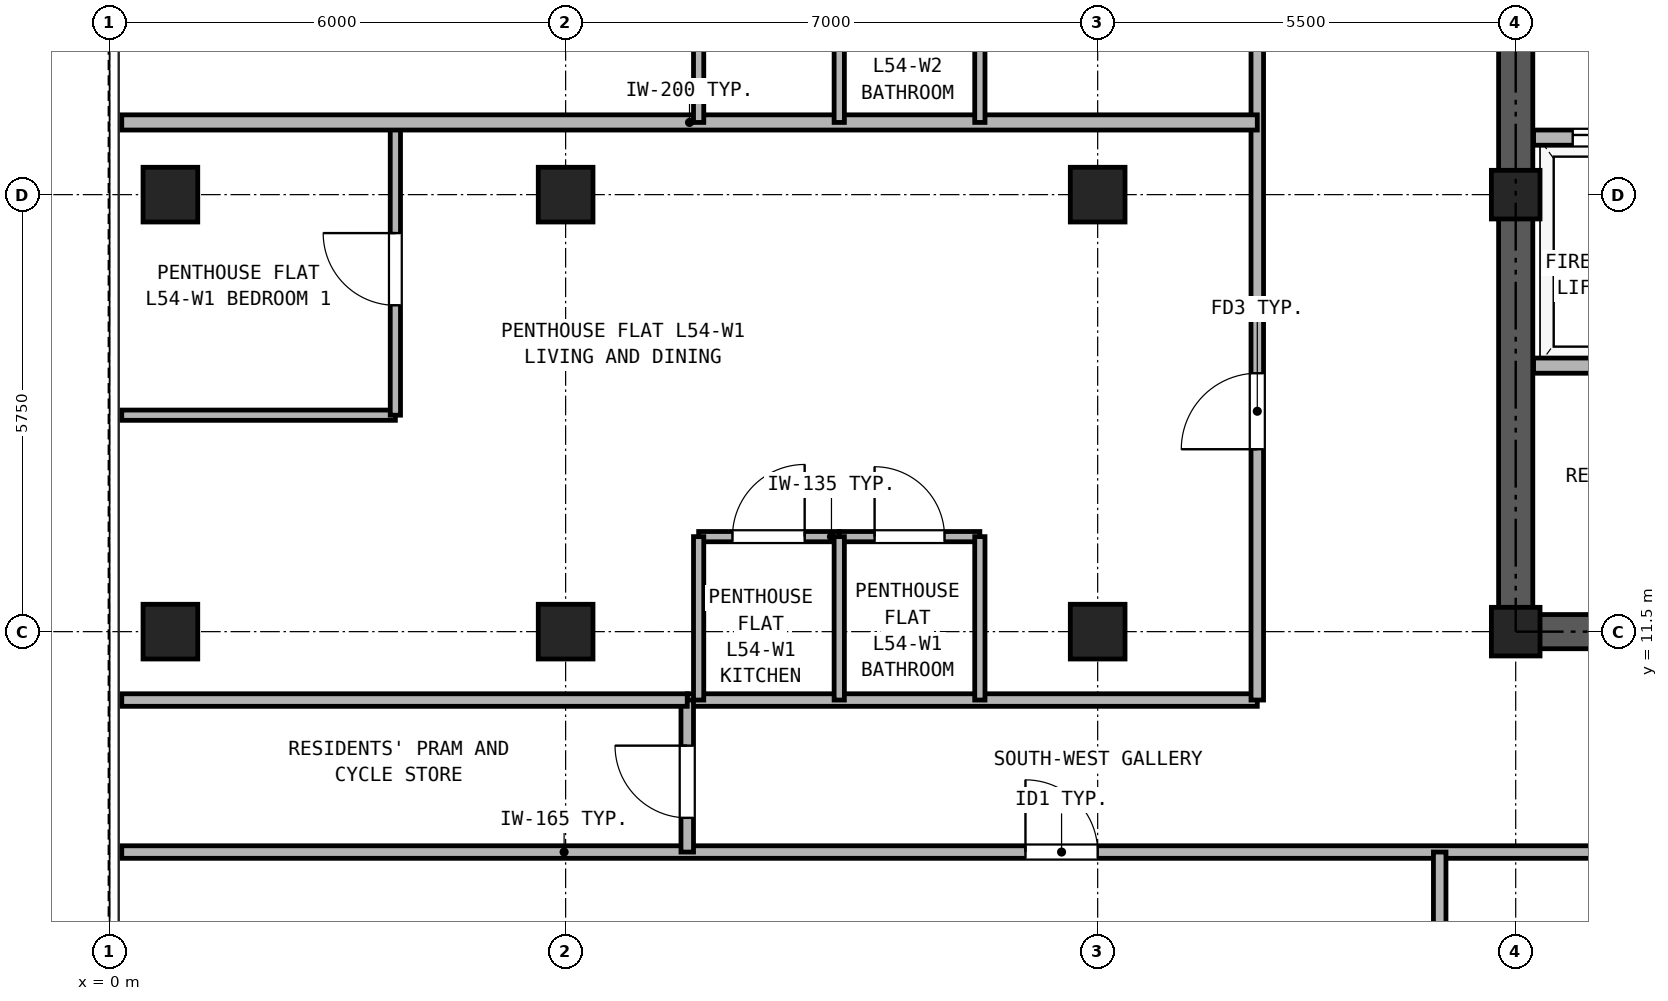
"""IFC4 building model, lengths in metres.
Left out: names, types, materials, properties, quantities, classifications, styles, units other than length and angle.
Written with IfcOpenShell. Run it as: python <this file> out.ifc"""

import sys

from ifc_helpers import new_model, si_unit, direction, frame, frame_2d, origin, origin_2d, place, context, subcontext, project, spatial, rectangle, hollow_rectangle, extrude, source, transform, mapped, element, fill, save


model = new_model("IFC4")
c1 = context("Model", 3, precision=1e-05, world=origin(), true_north=direction((0.0, 1.0)))
c2 = subcontext(c1, "Body", "Model", "MODEL_VIEW")
j1 = project(units=[si_unit("LENGTHUNIT", "METRE"), si_unit("PLANEANGLEUNIT", "RADIAN")], contexts=[c1])
p1 = place(None, origin())
s1 = spatial("IfcSite", under=j1, at=p1, CompositionType="ELEMENT")
p2 = place(p1, origin())
s2 = spatial("IfcBuilding", under=s1, at=p2, CompositionType="ELEMENT")
p3 = place(p2, frame((0.0, 0.0, 193.2)))
s3 = spatial("IfcBuildingStorey", under=s2, at=p3, CompositionType="ELEMENT", Elevation=193.2)
m1 = source(origin(), c2, "Body", "SweptSolid", [
    extrude(hollow_rectangle(XDim=0.72, YDim=0.72, WallThickness=0.04, at=origin_2d()), origin(), (0.0, 0.0, 1.0), 2.95),
])
for number, where, z_axis, x_axis in (
    (1, (0.8, 11.5, 0.0), (0.0, 0.0, 1.0), (1.0, 0.0, 0.0)),
    (2, (0.8, 17.25, 0.0), (0.0, 0.0, 1.0), (1.0, 0.0, 0.0)),
    (3, (6.0, 11.5, 0.0), (0.0, 0.0, 1.0), (1.0, 0.0, 0.0)),
    (4, (6.0, 17.25, 0.0), (0.0, 0.0, 1.0), (1.0, 0.0, 0.0)),
    (5, (13.0, 11.5, 0.0), (0.0, 0.0, 1.0), (1.0, 0.0, 0.0)),
    (6, (13.0, 17.25, 0.0), (0.0, 0.0, 1.0), (1.0, 0.0, 0.0)),
):
    element("IfcColumn", number, at=place(p3, frame(where, z_axis=z_axis, x_axis=x_axis)), inside=s3, PredefinedType="COLUMN", context=c2, shape_type="MappedRepresentation", body=[
        mapped(m1, transform((0.0, 0.0, 0.0), x_axis=(1.0, 0.0, 0.0), y_axis=(0.0, 1.0, 0.0), z_axis=(0.0, 0.0, 1.0), scale=1.0)),
    ])
m2 = source(origin(), c2, "Body", "SweptSolid", [
    extrude(hollow_rectangle(XDim=0.64, YDim=0.64, WallThickness=0.035, at=origin_2d()), origin(), (0.0, 0.0, 1.0), 2.95),
])
for number, where, z_axis, x_axis in (
    (7, (18.5, 11.5, 0.0), (0.0, 0.0, 1.0), (1.0, 0.0, 0.0)),
    (8, (18.5, 17.25, 0.0), (0.0, 0.0, 1.0), (1.0, 0.0, 0.0)),
):
    element("IfcColumn", number, at=place(p3, frame(where, z_axis=z_axis, x_axis=x_axis)), inside=s3, PredefinedType="COLUMN", context=c2, shape_type="MappedRepresentation", body=[
        mapped(m2, transform((0.0, 0.0, 0.0), x_axis=(1.0, 0.0, 0.0), y_axis=(0.0, 1.0, 0.0), z_axis=(0.0, 0.0, 1.0), scale=1.0)),
    ])
p4 = place(p3, frame((18.275, 11.5, 0.0), z_axis=(0.0, 0.0, 1.0), x_axis=(1.0, 0.0, 0.0)))
e9 = element("IfcWall", 9, at=p4, inside=s3, PredefinedType="SHEAR", context=c2, shape_type="SweptSolid", body=[
    extrude(rectangle(XDim=10.45, YDim=0.45, at=frame_2d((5.225, 0.0))), origin(), (0.0, 0.0, 1.0), 2.95),
])
p5 = place(p4, frame((1.825, 0.0, 0.0)))
e10 = element("IfcOpeningElement", 10, at=p5, cuts=e9, PredefinedType="OPENING", context=c2, shape_type="SweptSolid", body=[
    extrude(rectangle(XDim=0.95, YDim=2.15, at=frame_2d((0.475, 1.075))), frame((0.0, 0.235, 0.0), z_axis=(0.0, -1.0, 0.0), x_axis=(1.0, 0.0, 0.0)), (0.0, 0.0, 1.0), 0.47),
])
p6 = place(p4, frame((5.325, 0.0, 0.0)))
e11 = element("IfcOpeningElement", 11, at=p6, cuts=e9, PredefinedType="OPENING", context=c2, shape_type="SweptSolid", body=[
    extrude(rectangle(XDim=0.95, YDim=2.15, at=frame_2d((0.475, 1.075))), frame((0.0, 0.235, 0.0), z_axis=(0.0, -1.0, 0.0), x_axis=(1.0, 0.0, 0.0)), (0.0, 0.0, 1.0), 0.47),
])
p7 = place(p4, frame((8.225, 0.0, 0.0)))
e12 = element("IfcOpeningElement", 12, at=p7, cuts=e9, PredefinedType="OPENING", context=c2, shape_type="SweptSolid", body=[
    extrude(rectangle(XDim=1.1, YDim=2.25, at=frame_2d((0.55, 1.125))), frame((0.0, 0.235, 0.0), z_axis=(0.0, -1.0, 0.0), x_axis=(1.0, 0.0, 0.0)), (0.0, 0.0, 1.0), 0.47),
])
p8 = place(p3, frame((18.5, 11.725, 0.0), z_axis=(0.0, 0.0, 1.0), x_axis=(0.0, 1.0, 0.0)))
e13 = element("IfcWall", 13, at=p8, inside=s3, PredefinedType="SHEAR", context=c2, shape_type="SweptSolid", body=[
    extrude(rectangle(XDim=16.8, YDim=0.45, at=frame_2d((8.4, 0.0))), origin(), (0.0, 0.0, 1.0), 2.95),
])
p9 = place(p8, frame((7.425, 0.0, 0.0)))
e14 = element("IfcOpeningElement", 14, at=p9, cuts=e13, PredefinedType="OPENING", context=c2, shape_type="SweptSolid", body=[
    extrude(rectangle(XDim=1.15, YDim=2.2, at=frame_2d((0.575, 1.1))), frame((0.0, 0.235, 0.0), z_axis=(0.0, -1.0, 0.0), x_axis=(1.0, 0.0, 0.0)), (0.0, 0.0, 1.0), 0.47),
])
p10 = place(p3, frame((18.735, 18.0, 0.0), z_axis=(0.0, 0.0, 1.0), x_axis=(1.0, 0.0, 0.0)))
e15 = element("IfcWall", 15, at=p10, inside=s3, PredefinedType="PARTITIONING", context=c2, shape_type="SweptSolid", body=[
    extrude(rectangle(XDim=9.53, YDim=0.2, at=frame_2d((4.765, 0.0))), origin(), (0.0, 0.0, 1.0), 2.95),
])
p11 = place(p10, frame((0.515, 0.0, 0.0)))
e16 = element("IfcOpeningElement", 16, at=p11, cuts=e15, PredefinedType="OPENING", context=c2, shape_type="SweptSolid", body=[
    extrude(rectangle(XDim=1.3, YDim=2.3, at=frame_2d((0.65, 1.15))), frame((0.0, 0.11, 0.0), z_axis=(0.0, -1.0, 0.0), x_axis=(1.0, 0.0, 0.0)), (0.0, 0.0, 1.0), 0.22),
])
p12 = place(p10, frame((2.615, 0.0, 0.0)))
e17 = element("IfcOpeningElement", 17, at=p12, cuts=e15, PredefinedType="OPENING", context=c2, shape_type="SweptSolid", body=[
    extrude(rectangle(XDim=1.3, YDim=2.3, at=frame_2d((0.65, 1.15))), frame((0.0, 0.11, 0.0), z_axis=(0.0, -1.0, 0.0), x_axis=(1.0, 0.0, 0.0)), (0.0, 0.0, 1.0), 0.22),
])
p13 = place(p10, frame((5.035, 0.0, 0.0)))
e18 = element("IfcOpeningElement", 18, at=p13, cuts=e15, PredefinedType="OPENING", context=c2, shape_type="SweptSolid", body=[
    extrude(rectangle(XDim=0.9, YDim=2.05, at=frame_2d((0.45, 1.025))), frame((0.0, 0.11, 0.0), z_axis=(0.0, -1.0, 0.0), x_axis=(1.0, 0.0, 0.0)), (0.0, 0.0, 1.0), 0.22),
])
p14 = place(p10, frame((8.165, 0.0, 0.0)))
e19 = element("IfcOpeningElement", 19, at=p14, cuts=e15, PredefinedType="OPENING", context=c2, shape_type="SweptSolid", body=[
    extrude(rectangle(XDim=0.9, YDim=2.05, at=frame_2d((0.45, 1.025))), frame((0.0, 0.11, 0.0), z_axis=(0.0, -1.0, 0.0), x_axis=(1.0, 0.0, 0.0)), (0.0, 0.0, 1.0), 0.22),
])
p15 = place(p3, frame((18.735, 15.0, 0.0), z_axis=(0.0, 0.0, 1.0), x_axis=(1.0, 0.0, 0.0)))
e20 = element("IfcWall", 20, at=p15, inside=s3, PredefinedType="PARTITIONING", context=c2, shape_type="SweptSolid", body=[
    extrude(rectangle(XDim=9.53, YDim=0.2, at=frame_2d((4.765, 0.0))), origin(), (0.0, 0.0, 1.0), 2.95),
])
p16 = place(p3, frame((0.16, 8.6, 0.0), z_axis=(0.0, 0.0, 1.0), x_axis=(1.0, 0.0, 0.0)))
e21 = element("IfcWall", 21, at=p16, inside=s3, PredefinedType="PARTITIONING", context=c2, shape_type="SweptSolid", body=[
    extrude(rectangle(XDim=41.48, YDim=0.165, at=frame_2d((20.74, 0.0))), origin(), (0.0, 0.0, 1.0), 2.583),
])
p17 = place(p16, frame((11.89, 0.0, 0.0)))
e22 = element("IfcOpeningElement", 22, at=p17, cuts=e21, PredefinedType="OPENING", context=c2, shape_type="SweptSolid", body=[
    extrude(rectangle(XDim=0.95, YDim=2.15, at=frame_2d((0.475, 1.075))), frame((0.0, 0.093, 0.0), z_axis=(0.0, -1.0, 0.0), x_axis=(1.0, 0.0, 0.0)), (0.0, 0.0, 1.0), 0.185),
])
p18 = place(p16, frame((20.59, 0.0, 0.0)))
e23 = element("IfcOpeningElement", 23, at=p18, cuts=e21, PredefinedType="OPENING", context=c2, shape_type="SweptSolid", body=[
    extrude(rectangle(XDim=0.95, YDim=2.15, at=frame_2d((0.475, 1.075))), frame((0.0, 0.093, 0.0), z_axis=(0.0, -1.0, 0.0), x_axis=(1.0, 0.0, 0.0)), (0.0, 0.0, 1.0), 0.185),
])
p19 = place(p16, frame((27.59, 0.0, 0.0)))
e24 = element("IfcOpeningElement", 24, at=p19, cuts=e21, PredefinedType="OPENING", context=c2, shape_type="SweptSolid", body=[
    extrude(rectangle(XDim=0.95, YDim=2.15, at=frame_2d((0.475, 1.075))), frame((0.0, 0.093, 0.0), z_axis=(0.0, -1.0, 0.0), x_axis=(1.0, 0.0, 0.0)), (0.0, 0.0, 1.0), 0.185),
])
p20 = place(p16, frame((34.19, 0.0, 0.0)))
e25 = element("IfcOpeningElement", 25, at=p20, cuts=e21, PredefinedType="OPENING", context=c2, shape_type="SweptSolid", body=[
    extrude(rectangle(XDim=0.95, YDim=2.15, at=frame_2d((0.475, 1.075))), frame((0.0, 0.093, 0.0), z_axis=(0.0, -1.0, 0.0), x_axis=(1.0, 0.0, 0.0)), (0.0, 0.0, 1.0), 0.185),
])
p21 = place(p3, frame((7.6, 10.6, 0.0), z_axis=(0.0, 0.0, 1.0), x_axis=(1.0, 0.0, 0.0)))
e26 = element("IfcWall", 26, at=p21, inside=s3, PredefinedType="PARTITIONING", context=c2, shape_type="SweptSolid", body=[
    extrude(rectangle(XDim=7.5, YDim=0.165, at=frame_2d((3.75, 0.0))), origin(), (0.0, 0.0, 1.0), 2.95),
])
p22 = place(p3, frame((7.6, 8.6, 0.0), z_axis=(0.0, 0.0, 1.0), x_axis=(0.0, 1.0, 0.0)))
e27 = element("IfcWall", 27, at=p22, inside=s3, PredefinedType="PARTITIONING", context=c2, shape_type="SweptSolid", body=[
    extrude(rectangle(XDim=2.0, YDim=0.165, at=frame_2d((1.0, 0.0))), origin(), (0.0, 0.0, 1.0), 2.95),
])
p23 = place(p22, frame((0.45, 0.0, 0.0)))
e28 = element("IfcOpeningElement", 28, at=p23, cuts=e27, PredefinedType="OPENING", context=c2, shape_type="SweptSolid", body=[
    extrude(rectangle(XDim=0.95, YDim=2.15, at=frame_2d((0.475, 1.075))), frame((0.0, 0.093, 0.0), z_axis=(0.0, -1.0, 0.0), x_axis=(1.0, 0.0, 0.0)), (0.0, 0.0, 1.0), 0.185),
])
p24 = place(p3, frame((15.1, 10.6, 0.0), z_axis=(0.0, 0.0, 1.0), x_axis=(0.0, 1.0, 0.0)))
e29 = element("IfcWall", 29, at=p24, inside=s3, PredefinedType="PARTITIONING", context=c2, shape_type="SweptSolid", body=[
    extrude(rectangle(XDim=24.54, YDim=0.165, at=frame_2d((12.27, 0.0))), origin(), (0.0, 0.0, 1.0), 2.95),
])
p25 = place(p24, frame((3.3, 0.0, 0.0)))
e30 = element("IfcOpeningElement", 30, at=p25, cuts=e29, PredefinedType="OPENING", context=c2, shape_type="SweptSolid", body=[
    extrude(rectangle(XDim=1.0, YDim=2.15, at=frame_2d((0.5, 1.075))), frame((0.0, 0.093, 0.0), z_axis=(0.0, -1.0, 0.0), x_axis=(1.0, 0.0, 0.0)), (0.0, 0.0, 1.0), 0.185),
])
p26 = place(p24, frame((11.1, 0.0, 0.0)))
e31 = element("IfcOpeningElement", 31, at=p26, cuts=e29, PredefinedType="OPENING", context=c2, shape_type="SweptSolid", body=[
    extrude(rectangle(XDim=1.0, YDim=2.15, at=frame_2d((0.5, 1.075))), frame((0.0, 0.093, 0.0), z_axis=(0.0, -1.0, 0.0), x_axis=(1.0, 0.0, 0.0)), (0.0, 0.0, 1.0), 0.185),
])
p27 = place(p24, frame((18.0, 0.0, 0.0)))
e32 = element("IfcOpeningElement", 32, at=p27, cuts=e29, PredefinedType="OPENING", context=c2, shape_type="SweptSolid", body=[
    extrude(rectangle(XDim=1.0, YDim=2.15, at=frame_2d((0.5, 1.075))), frame((0.0, 0.093, 0.0), z_axis=(0.0, -1.0, 0.0), x_axis=(1.0, 0.0, 0.0)), (0.0, 0.0, 1.0), 0.185),
])
p28 = place(p3, frame((17.5, 0.16, 0.0), z_axis=(0.0, 0.0, 1.0), x_axis=(0.0, 1.0, 0.0)))
e33 = element("IfcWall", 33, at=p28, inside=s3, PredefinedType="PARTITIONING", context=c2, shape_type="SweptSolid", body=[
    extrude(rectangle(XDim=8.44, YDim=0.165, at=frame_2d((4.22, 0.0))), origin(), (0.0, 0.0, 1.0), 2.95),
])
p29 = place(p3, frame((0.16, 10.6, 0.0), z_axis=(0.0, 0.0, 1.0), x_axis=(1.0, 0.0, 0.0)))
e34 = element("IfcWall", 34, at=p29, inside=s3, PredefinedType="PARTITIONING", context=c2, shape_type="SweptSolid", body=[
    extrude(rectangle(XDim=7.44, YDim=0.165, at=frame_2d((3.72, 0.0))), origin(), (0.0, 0.0, 1.0), 2.95),
])
p30 = place(p3, frame((7.75, 12.75, 0.0), z_axis=(0.0, 0.0, 1.0), x_axis=(1.0, 0.0, 0.0)))
e35 = element("IfcWall", 35, at=p30, inside=s3, PredefinedType="PARTITIONING", context=c2, shape_type="SweptSolid", body=[
    extrude(rectangle(XDim=1.85, YDim=0.135, at=frame_2d((0.925, 0.0))), origin(), (0.0, 0.0, 1.0), 2.95),
])
p31 = place(p30, frame((0.445, 0.0, 0.0)))
e36 = element("IfcOpeningElement", 36, at=p31, cuts=e35, PredefinedType="OPENING", context=c2, shape_type="SweptSolid", body=[
    extrude(rectangle(XDim=0.95, YDim=2.15, at=frame_2d((0.475, 1.075))), frame((0.0, 0.077, 0.0), z_axis=(0.0, -1.0, 0.0), x_axis=(1.0, 0.0, 0.0)), (0.0, 0.0, 1.0), 0.155),
])
p32 = place(p3, frame((9.6, 12.75, 0.0), z_axis=(0.0, 0.0, 1.0), x_axis=(1.0, 0.0, 0.0)))
e37 = element("IfcWall", 37, at=p32, inside=s3, PredefinedType="PARTITIONING", context=c2, shape_type="SweptSolid", body=[
    extrude(rectangle(XDim=1.85, YDim=0.135, at=frame_2d((0.925, 0.0))), origin(), (0.0, 0.0, 1.0), 2.95),
])
p33 = place(p32, frame((0.465, 0.0, 0.0)))
e38 = element("IfcOpeningElement", 38, at=p33, cuts=e37, PredefinedType="OPENING", context=c2, shape_type="SweptSolid", body=[
    extrude(rectangle(XDim=0.92, YDim=2.1, at=frame_2d((0.46, 1.05))), frame((0.0, 0.077, 0.0), z_axis=(0.0, -1.0, 0.0), x_axis=(1.0, 0.0, 0.0)), (0.0, 0.0, 1.0), 0.155),
])
for number, where, z_axis, x_axis in (
    (39, (7.75, 10.6, 0.0), (0.0, 0.0, 1.0), (0.0, 1.0, 0.0)),
    (40, (9.6, 10.6, 0.0), (0.0, 0.0, 1.0), (0.0, 1.0, 0.0)),
    (41, (11.45, 10.6, 0.0), (0.0, 0.0, 1.0), (0.0, 1.0, 0.0)),
):
    element("IfcWall", number, at=place(p3, frame(where, z_axis=z_axis, x_axis=x_axis)), inside=s3, PredefinedType="PARTITIONING", context=c2, shape_type="SweptSolid", body=[
        extrude(rectangle(XDim=2.15, YDim=0.135, at=frame_2d((1.075, 0.0))), origin(), (0.0, 0.0, 1.0), 2.95),
    ])
p34 = place(p3, frame((0.16, 14.348, 0.0), z_axis=(0.0, 0.0, 1.0), x_axis=(1.0, 0.0, 0.0)))
e42 = element("IfcWall", 42, at=p34, inside=s3, PredefinedType="PARTITIONING", context=c2, shape_type="SweptSolid", body=[
    extrude(rectangle(XDim=3.6, YDim=0.135, at=frame_2d((1.8, 0.0))), origin(), (0.0, 0.0, 1.0), 2.583),
])
p35 = place(p3, frame((3.76, 14.348, 0.0), z_axis=(0.0, 0.0, 1.0), x_axis=(0.0, 1.0, 0.0)))
e43 = element("IfcWall", 43, at=p35, inside=s3, PredefinedType="PARTITIONING", context=c2, shape_type="SweptSolid", body=[
    extrude(rectangle(XDim=3.852, YDim=0.135, at=frame_2d((1.926, 0.0))), origin(), (0.0, 0.0, 1.0), 2.95),
])
p36 = place(p35, frame((1.446, 0.0, 0.0)))
e44 = element("IfcOpeningElement", 44, at=p36, cuts=e43, PredefinedType="OPENING", context=c2, shape_type="SweptSolid", body=[
    extrude(rectangle(XDim=0.95, YDim=2.15, at=frame_2d((0.475, 1.075))), frame((0.0, 0.077, 0.0), z_axis=(0.0, -1.0, 0.0), x_axis=(1.0, 0.0, 0.0)), (0.0, 0.0, 1.0), 0.155),
])
p37 = place(p3, frame((0.16, 18.2, 0.0), z_axis=(0.0, 0.0, 1.0), x_axis=(1.0, 0.0, 0.0)))
e45 = element("IfcWall", 45, at=p37, inside=s3, PredefinedType="PARTITIONING", context=c2, shape_type="SweptSolid", body=[
    extrude(rectangle(XDim=14.94, YDim=0.2, at=frame_2d((7.47, 0.0))), origin(), (0.0, 0.0, 1.0), 2.95),
])
for number, where, z_axis, x_axis in (
    (46, (7.75, 18.2, 0.0), (0.0, 0.0, 1.0), (0.0, 1.0, 0.0)),
    (47, (9.6, 18.2, 0.0), (0.0, 0.0, 1.0), (0.0, 1.0, 0.0)),
    (48, (11.45, 18.2, 0.0), (0.0, 0.0, 1.0), (0.0, 1.0, 0.0)),
):
    element("IfcWall", number, at=place(p3, frame(where, z_axis=z_axis, x_axis=x_axis)), inside=s3, PredefinedType="PARTITIONING", context=c2, shape_type="SweptSolid", body=[
        extrude(rectangle(XDim=2.15, YDim=0.135, at=frame_2d((1.075, 0.0))), origin(), (0.0, 0.0, 1.0), 2.95),
    ])
p38 = place(p11, origin())
e49 = element("IfcDoor", 49, at=p38, inside=s3, OperationType="DOUBLE_DOOR_SLIDING", PredefinedType="DOOR", context=c2, shape_type="SweptSolid", body=[
    extrude(rectangle(XDim=1.3, YDim=2.3, at=frame_2d((0.65, 1.15))), frame((0.0, 0.025, 0.0), z_axis=(0.0, -1.0, 0.0), x_axis=(1.0, 0.0, 0.0)), (0.0, 0.0, 1.0), 0.05),
])
fill(e16, e49)
p39 = place(p17, frame((0.95, 0.0, 0.0), z_axis=(0.0, 0.0, 1.0), x_axis=(-1.0, 0.0, 0.0)))
e50 = element("IfcDoor", 50, at=p39, inside=s3, OperationType="SINGLE_SWING_LEFT", PredefinedType="DOOR", context=c2, shape_type="SweptSolid", body=[
    extrude(rectangle(XDim=0.95, YDim=2.15, at=frame_2d((0.475, 1.075))), frame((0.0, 0.025, 0.0), z_axis=(0.0, -1.0, 0.0), x_axis=(1.0, 0.0, 0.0)), (0.0, 0.0, 1.0), 0.05),
])
fill(e22, e50)
p40 = place(p23, frame((0.95, 0.0, 0.0), z_axis=(0.0, 0.0, 1.0), x_axis=(-1.0, 0.0, 0.0)))
e51 = element("IfcDoor", 51, at=p40, inside=s3, OperationType="SINGLE_SWING_RIGHT", PredefinedType="DOOR", context=c2, shape_type="SweptSolid", body=[
    extrude(rectangle(XDim=0.95, YDim=2.15, at=frame_2d((0.475, 1.075))), frame((0.0, 0.025, 0.0), z_axis=(0.0, -1.0, 0.0), x_axis=(1.0, 0.0, 0.0)), (0.0, 0.0, 1.0), 0.05),
])
fill(e28, e51)
p41 = place(p31, origin())
e52 = element("IfcDoor", 52, at=p41, inside=s3, OperationType="SINGLE_SWING_RIGHT", PredefinedType="DOOR", context=c2, shape_type="SweptSolid", body=[
    extrude(rectangle(XDim=0.95, YDim=2.15, at=frame_2d((0.475, 1.075))), frame((0.0, 0.025, 0.0), z_axis=(0.0, -1.0, 0.0), x_axis=(1.0, 0.0, 0.0)), (0.0, 0.0, 1.0), 0.05),
])
fill(e36, e52)
p42 = place(p33, origin())
e53 = element("IfcDoor", 53, at=p42, inside=s3, OperationType="SINGLE_SWING_LEFT", PredefinedType="DOOR", context=c2, shape_type="SweptSolid", body=[
    extrude(rectangle(XDim=0.92, YDim=2.1, at=frame_2d((0.46, 1.05))), frame((0.0, 0.025, 0.0), z_axis=(0.0, -1.0, 0.0), x_axis=(1.0, 0.0, 0.0)), (0.0, 0.0, 1.0), 0.05),
])
fill(e38, e53)
p43 = place(p36, origin())
e54 = element("IfcDoor", 54, at=p43, inside=s3, OperationType="SINGLE_SWING_RIGHT", PredefinedType="DOOR", context=c2, shape_type="SweptSolid", body=[
    extrude(rectangle(XDim=0.95, YDim=2.15, at=frame_2d((0.475, 1.075))), frame((0.0, 0.025, 0.0), z_axis=(0.0, -1.0, 0.0), x_axis=(1.0, 0.0, 0.0)), (0.0, 0.0, 1.0), 0.05),
])
fill(e44, e54)
p44 = place(p25, origin())
e55 = element("IfcDoor", 55, at=p44, inside=s3, OperationType="SINGLE_SWING_LEFT", PredefinedType="DOOR", context=c2, shape_type="SweptSolid", body=[
    extrude(rectangle(XDim=1.0, YDim=2.15, at=frame_2d((0.5, 1.075))), frame((0.0, 0.025, 0.0), z_axis=(0.0, -1.0, 0.0), x_axis=(1.0, 0.0, 0.0)), (0.0, 0.0, 1.0), 0.05),
])
fill(e30, e55)
save(model, sys.argv[1])
